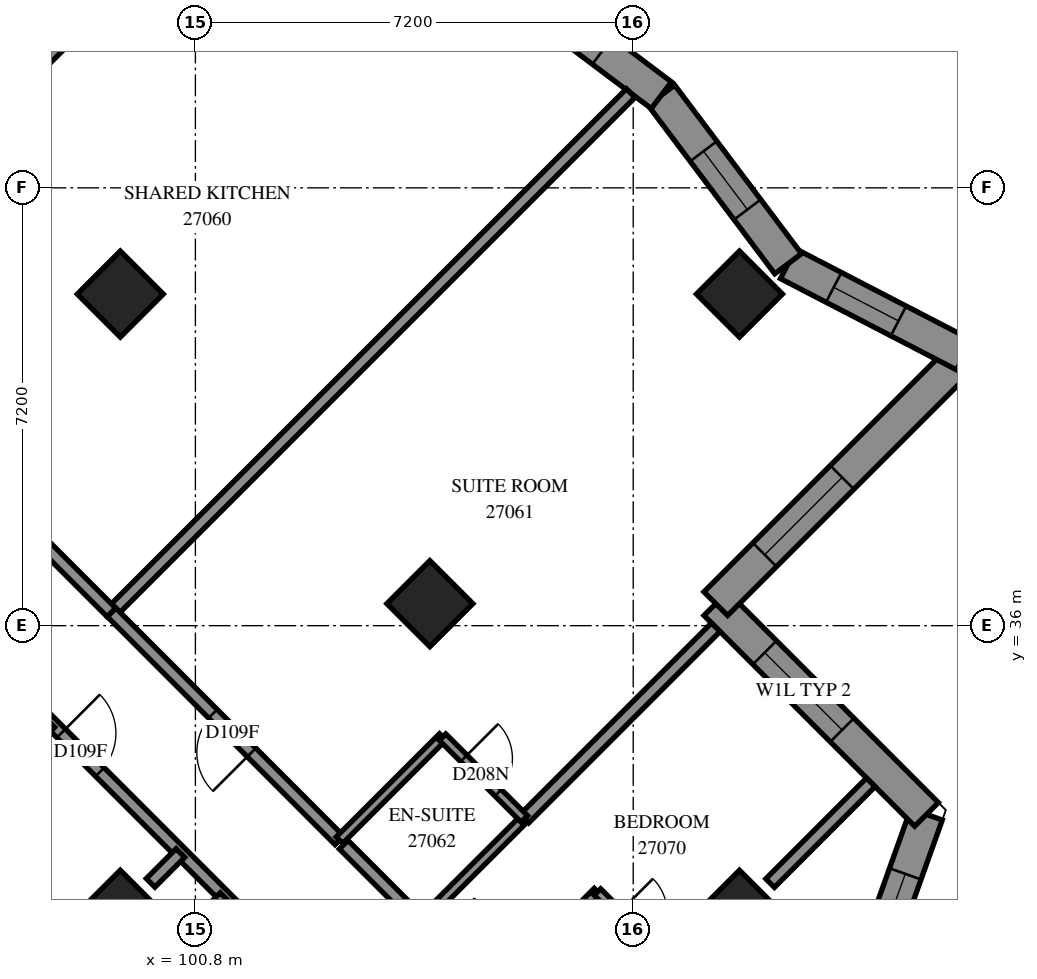
"""IFC4 building model, lengths in metres.
Left out: names, types, materials, properties, quantities, classifications, styles, units other than length and angle.
Written with IfcOpenShell. Run it as: python <this file> out.ifc"""

import sys

from ifc_helpers import new_model, si_unit, direction, frame, frame_2d, origin, origin_2d, place, context, subcontext, project, spatial, polyline, rectangle, outline, extrude, element, fill, save


model = new_model("IFC4")
c1 = context("Model", 3, precision=1e-05, world=origin(), true_north=direction((0.0, 1.0)))
c2 = subcontext(c1, "Body", "Model", "MODEL_VIEW")
j1 = project(units=[si_unit("LENGTHUNIT", "METRE"), si_unit("PLANEANGLEUNIT", "RADIAN")], contexts=[c1])
p1 = place(None, origin())
s1 = spatial("IfcSite", under=j1, at=p1, CompositionType="ELEMENT")
p2 = place(p1, origin())
s2 = spatial("IfcBuilding", under=s1, at=p2, CompositionType="ELEMENT")
p3 = place(p2, frame((0.0, 0.0, 101.6)))
s3 = spatial("IfcBuildingStorey", under=s2, at=p3, CompositionType="ELEMENT", Elevation=101.6)
for number, where, z_axis, x_axis in (
    (1, (99.565, 41.453, 0.0), (0.0, 0.0, 1.0), (0.707, -0.707, 0.0)),
    (2, (109.747, 41.453, 0.0), (0.0, 0.0, 1.0), (0.707, -0.707, 0.0)),
    (3, (104.656, 36.362, 0.0), (0.0, 0.0, 1.0), (0.707, -0.707, 0.0)),
    (4, (99.565, 31.271, 0.0), (0.0, 0.0, 1.0), (0.707, -0.707, 0.0)),
    (5, (109.747, 31.271, 0.0), (0.0, 0.0, 1.0), (0.707, -0.707, 0.0)),
):
    element("IfcColumn", number, at=place(p3, frame(where, z_axis=z_axis, x_axis=x_axis)), inside=s3, PredefinedType="COLUMN", context=c2, shape_type="SweptSolid", body=[
        extrude(rectangle(XDim=1.0, YDim=1.0, at=origin_2d()), origin(), (0.0, 0.0, 1.0), 3.1),
    ])
p4 = place(p3, frame((111.036, 27.895, 0.0), z_axis=(0.0, 0.0, 1.0), x_axis=(0.3366083403, 0.9416447447, 0.0)))
e6 = element("IfcWall", 6, at=p4, inside=s3, PredefinedType="SOLIDWALL", context=c2, shape_type="SweptSolid", body=[
    extrude(outline(polyline([(-0.125, -0.275), (5.485, -0.275), (5.137, 0.275), (0.125, 0.275), (-0.125, -0.275)])), origin(), (0.0, 0.0, 1.0), 3.1),
])
p5 = place(p4, frame((1.472, 0.0, 0.5)))
e7 = element("IfcOpeningElement", 7, at=p5, cuts=e6, PredefinedType="OPENING", context=c2, shape_type="SweptSolid", body=[
    extrude(rectangle(XDim=1.3, YDim=2.45, at=frame_2d((0.65, 1.225))), frame((0.0, 0.285, 0.0), z_axis=(0.0, -1.0, 0.0), x_axis=(1.0, 0.0, 0.0)), (0.0, 0.0, 1.0), 0.57),
])
p6 = place(p4, frame((2.972, 0.0, 0.5)))
e8 = element("IfcOpeningElement", 8, at=p6, cuts=e6, PredefinedType="OPENING", context=c2, shape_type="SweptSolid", body=[
    extrude(rectangle(XDim=1.3, YDim=2.45, at=frame_2d((0.65, 1.225))), frame((0.0, 0.285, 0.0), z_axis=(0.0, -1.0, 0.0), x_axis=(1.0, 0.0, 0.0)), (0.0, 0.0, 1.0), 0.57),
])
p7 = place(p3, frame((112.823, 32.896, 0.0), z_axis=(0.0, 0.0, 1.0), x_axis=(-0.7070965789, 0.7071169833, 0.0)))
e9 = element("IfcWall", 9, at=p7, inside=s3, PredefinedType="SOLIDWALL", context=c2, shape_type="SweptSolid", body=[
    extrude(outline(polyline([(-0.174, -0.275), (4.626, -0.275), (5.176, 0.275), (0.174, 0.275), (-0.174, -0.275)])), origin(), (0.0, 0.0, 1.0), 3.1),
])
p8 = place(p7, frame((1.963, 0.0, 0.6)))
e10 = element("IfcOpeningElement", 10, at=p8, cuts=e9, PredefinedType="OPENING", context=c2, shape_type="SweptSolid", body=[
    extrude(rectangle(XDim=1.8, YDim=1.9, at=frame_2d((0.9, 0.95))), frame((0.0, 0.285, 0.0), z_axis=(0.0, -1.0, 0.0), x_axis=(1.0, 0.0, 0.0)), (0.0, 0.0, 1.0), 0.57),
])
p9 = place(p3, frame((109.358, 36.362, 0.0), z_axis=(0.0, 0.0, 1.0), x_axis=(0.7071067812, 0.7071067812, 0.0)))
e11 = element("IfcWall", 11, at=p9, inside=s3, PredefinedType="SOLIDWALL", context=c2, shape_type="SweptSolid", body=[
    extrude(outline(polyline([(0.275, -0.275), (6.157, -0.275), (5.405, 0.275), (-0.275, 0.275), (0.275, -0.275)])), origin(), (0.0, 0.0, 1.0), 3.1),
])
p10 = place(p9, frame((1.137, 0.0, 0.6)))
e12 = element("IfcOpeningElement", 12, at=p10, cuts=e11, PredefinedType="OPENING", context=c2, shape_type="SweptSolid", body=[
    extrude(rectangle(XDim=1.8, YDim=1.9, at=frame_2d((0.9, 0.95))), frame((0.0, 0.285, 0.0), z_axis=(0.0, -1.0, 0.0), x_axis=(1.0, 0.0, 0.0)), (0.0, 0.0, 1.0), 0.57),
])
p11 = place(p3, frame((113.446, 40.45, 0.0), z_axis=(0.0, 0.0, 1.0), x_axis=(-0.8878203528, 0.4601902011, 0.0)))
e13 = element("IfcWall", 13, at=p11, inside=s3, PredefinedType="SOLIDWALL", context=c2, shape_type="SweptSolid", body=[
    extrude(outline(polyline([(-0.376, -0.275), (3.202, -0.275), (3.327, 0.275), (0.376, 0.275), (-0.376, -0.275)])), origin(), (0.0, 0.0, 1.0), 3.1),
])
p12 = place(p11, frame((1.22, 0.0, 0.5)))
e14 = element("IfcOpeningElement", 14, at=p12, cuts=e13, PredefinedType="OPENING", context=c2, shape_type="SweptSolid", body=[
    extrude(rectangle(XDim=1.2, YDim=2.45, at=frame_2d((0.6, 1.225))), frame((0.0, 0.285, 0.0), z_axis=(0.0, -1.0, 0.0), x_axis=(1.0, 0.0, 0.0)), (0.0, 0.0, 1.0), 0.57),
])
p13 = place(p3, frame((110.547, 41.952, 0.0), z_axis=(0.0, 0.0, 1.0), x_axis=(-0.6011988974, 0.7990994217, 0.0)))
e15 = element("IfcWall", 15, at=p13, inside=s3, PredefinedType="SOLIDWALL", context=c2, shape_type="SweptSolid", body=[
    extrude(outline(polyline([(0.063, -0.275), (3.507, -0.275), (3.429, 0.275), (-0.063, 0.275), (0.063, -0.275)])), origin(), (0.0, 0.0, 1.0), 3.1),
])
p14 = place(p13, frame((1.115, 0.0, 0.5)))
e16 = element("IfcOpeningElement", 16, at=p14, cuts=e15, PredefinedType="OPENING", context=c2, shape_type="SweptSolid", body=[
    extrude(rectangle(XDim=1.2, YDim=2.45, at=frame_2d((0.6, 1.225))), frame((0.0, 0.285, 0.0), z_axis=(0.0, -1.0, 0.0), x_axis=(1.0, 0.0, 0.0)), (0.0, 0.0, 1.0), 0.57),
])
p15 = place(p3, frame((108.463, 44.723, 0.0), z_axis=(0.0, 0.0, 1.0), x_axis=(-0.7991072191, 0.6011885331, 0.0)))
e17 = element("IfcWall", 17, at=p15, inside=s3, PredefinedType="SOLIDWALL", context=c2, shape_type="SweptSolid", body=[
    extrude(outline(polyline([(-0.039, -0.275), (3.405, -0.275), (3.483, 0.275), (0.039, 0.275), (-0.039, -0.275)])), origin(), (0.0, 0.0, 1.0), 3.1),
])
p16 = place(p15, frame((1.214, 0.0, 0.5)))
e18 = element("IfcOpeningElement", 18, at=p16, cuts=e17, PredefinedType="OPENING", context=c2, shape_type="SweptSolid", body=[
    extrude(rectangle(XDim=1.2, YDim=2.45, at=frame_2d((0.6, 1.225))), frame((0.0, 0.285, 0.0), z_axis=(0.0, -1.0, 0.0), x_axis=(1.0, 0.0, 0.0)), (0.0, 0.0, 1.0), 0.57),
])
p17 = place(p3, frame((92.004, 40.819, 0.0), z_axis=(0.0, 0.0, 1.0), x_axis=(0.7071067812, -0.7071067812, 0.0)))
e19 = element("IfcWall", 19, at=p17, inside=s3, PredefinedType="PARTITIONING", context=c2, shape_type="SweptSolid", body=[
    extrude(rectangle(XDim=19.298, YDim=0.2, at=frame_2d((9.649, 0.0))), origin(), (0.0, 0.0, 1.0), 3.1),
])
p18 = place(p17, frame((3.489, 0.0, 0.0)))
e20 = element("IfcOpeningElement", 20, at=p18, cuts=e19, PredefinedType="OPENING", context=c2, shape_type="SweptSolid", body=[
    extrude(rectangle(XDim=0.9, YDim=2.1, at=frame_2d((0.45, 1.05))), frame((0.0, 0.11, 0.0), z_axis=(0.0, -1.0, 0.0), x_axis=(1.0, 0.0, 0.0)), (0.0, 0.0, 1.0), 0.22),
])
p19 = place(p17, frame((9.319, 0.0, 0.0)))
e21 = element("IfcOpeningElement", 21, at=p19, cuts=e19, PredefinedType="OPENING", context=c2, shape_type="SweptSolid", body=[
    extrude(rectangle(XDim=0.9, YDim=2.1, at=frame_2d((0.45, 1.05))), frame((0.0, 0.11, 0.0), z_axis=(0.0, -1.0, 0.0), x_axis=(1.0, 0.0, 0.0)), (0.0, 0.0, 1.0), 0.22),
])
p20 = place(p17, frame((15.961, 0.0, 0.0)))
e22 = element("IfcOpeningElement", 22, at=p20, cuts=e19, PredefinedType="OPENING", context=c2, shape_type="SweptSolid", body=[
    extrude(rectangle(XDim=0.9, YDim=2.1, at=frame_2d((0.45, 1.05))), frame((0.0, 0.11, 0.0), z_axis=(0.0, -1.0, 0.0), x_axis=(1.0, 0.0, 0.0)), (0.0, 0.0, 1.0), 0.22),
])
p21 = place(p3, frame((99.423, 36.221, 0.0), z_axis=(0.0, 0.0, 1.0), x_axis=(0.7071067812, 0.7071067812, 0.0)))
e23 = element("IfcWall", 23, at=p21, inside=s3, PredefinedType="PARTITIONING", context=c2, shape_type="SweptSolid", body=[
    extrude(rectangle(XDim=12.072, YDim=0.2, at=frame_2d((6.036, 0.0))), origin(), (0.0, 0.0, 1.0), 3.1),
])
p22 = place(p3, frame((94.331, 41.313, 0.0), z_axis=(0.0, 0.0, 1.0), x_axis=(0.7071109413, 0.7071026211, 0.0)))
e24 = element("IfcWall", 24, at=p22, inside=s3, PredefinedType="PARTITIONING", context=c2, shape_type="SweptSolid", body=[
    extrude(rectangle(XDim=12.019, YDim=0.2, at=frame_2d((6.01, 0.0))), origin(), (0.0, 0.0, 1.0), 3.1),
])
p23 = place(p3, frame((93.413, 42.233, 0.0), z_axis=(0.0, 0.0, 1.0), x_axis=(0.7071067812, 0.7071067812, 0.0)))
e25 = element("IfcWall", 25, at=p23, inside=s3, PredefinedType="PARTITIONING", context=c2, shape_type="SweptSolid", body=[
    extrude(rectangle(XDim=9.699, YDim=0.2, at=frame_2d((4.849, 0.0))), origin(), (0.0, 0.0, 1.0), 3.1),
])
p24 = place(p23, frame((0.249, 0.0, 0.0)))
e26 = element("IfcOpeningElement", 26, at=p24, cuts=e25, PredefinedType="OPENING", context=c2, shape_type="SweptSolid", body=[
    extrude(rectangle(XDim=1.0, YDim=2.1, at=frame_2d((0.5, 1.05))), frame((0.0, 0.11, 0.0), z_axis=(0.0, -1.0, 0.0), x_axis=(1.0, 0.0, 0.0)), (0.0, 0.0, 1.0), 0.22),
])
p25 = place(p3, frame((93.411, 42.227, 0.0), z_axis=(0.0, 0.0, 1.0), x_axis=(0.7071067812, -0.7071067812, 0.0)))
e27 = element("IfcWall", 27, at=p25, inside=s3, PredefinedType="PARTITIONING", context=c2, shape_type="SweptSolid", body=[
    extrude(rectangle(XDim=8.499, YDim=0.2, at=frame_2d((4.25, 0.0))), origin(), (0.0, 0.0, 1.0), 3.1),
])
p26 = place(p25, frame((3.672, 0.0, 0.0)))
e28 = element("IfcOpeningElement", 28, at=p26, cuts=e27, PredefinedType="OPENING", context=c2, shape_type="SweptSolid", body=[
    extrude(rectangle(XDim=1.0, YDim=2.1, at=frame_2d((0.5, 1.05))), frame((0.0, 0.11, 0.0), z_axis=(0.0, -1.0, 0.0), x_axis=(1.0, 0.0, 0.0)), (0.0, 0.0, 1.0), 0.22),
])
p27 = place(p3, frame((103.239, 32.399, 0.0), z_axis=(0.0, 0.0, 1.0), x_axis=(0.7071067812, -0.7071067812, 0.0)))
e29 = element("IfcWall", 29, at=p27, inside=s3, PredefinedType="PARTITIONING", context=c2, shape_type="SweptSolid", body=[
    extrude(rectangle(XDim=5.399, YDim=0.2, at=frame_2d((2.7, 0.0))), origin(), (0.0, 0.0, 1.0), 3.1),
])
p28 = place(p27, frame((2.15, 0.0, 0.0)))
e30 = element("IfcOpeningElement", 30, at=p28, cuts=e29, PredefinedType="OPENING", context=c2, shape_type="SweptSolid", body=[
    extrude(rectangle(XDim=0.9, YDim=2.1, at=frame_2d((0.45, 1.05))), frame((0.0, 0.11, 0.0), z_axis=(0.0, -1.0, 0.0), x_axis=(1.0, 0.0, 0.0)), (0.0, 0.0, 1.0), 0.22),
])
p29 = place(p3, frame((103.168, 32.47, 0.0), z_axis=(0.0, 0.0, 1.0), x_axis=(-0.7067858967, 0.7074275201, 0.0)))
e31 = element("IfcWall", 31, at=p29, inside=s3, PredefinedType="PARTITIONING", context=c2, shape_type="SweptSolid", body=[
    extrude(rectangle(XDim=5.299, YDim=0.2, at=frame_2d((2.65, 0.0))), origin(), (0.0, 0.0, 1.0), 3.1),
])
p30 = place(p29, frame((2.043, 0.0, 0.0)))
e32 = element("IfcOpeningElement", 32, at=p30, cuts=e31, PredefinedType="OPENING", context=c2, shape_type="SweptSolid", body=[
    extrude(rectangle(XDim=0.9, YDim=2.1, at=frame_2d((0.45, 1.05))), frame((0.0, 0.11, 0.0), z_axis=(0.0, -1.0, 0.0), x_axis=(1.0, 0.0, 0.0)), (0.0, 0.0, 1.0), 0.22),
])
p31 = place(p3, frame((106.211, 32.827, 0.0), z_axis=(0.0, 0.0, 1.0), x_axis=(0.7071067812, 0.7071067812, 0.0)))
e33 = element("IfcWall", 33, at=p31, inside=s3, PredefinedType="PARTITIONING", context=c2, shape_type="SweptSolid", body=[
    extrude(rectangle(XDim=4.45, YDim=0.2, at=frame_2d((2.225, 0.0))), origin(), (0.0, 0.0, 1.0), 3.1),
])
for number, where, z_axis, x_axis in (
    (34, (96.735, 32.685, 0.0), (0.0, 0.0, 1.0), (0.707, 0.707, 0.0)),
    (35, (103.169, 32.473, 0.0), (0.0, 0.0, 1.0), (0.707, 0.707, 0.0)),
    (36, (99.563, 29.857, 0.0), (0.0, 0.0, 1.0), (0.707, 0.707, 0.0)),
):
    element("IfcWall", number, at=place(p3, frame(where, z_axis=z_axis, x_axis=x_axis)), inside=s3, PredefinedType="PARTITIONING", context=c2, shape_type="SweptSolid", body=[
        extrude(rectangle(XDim=2.401, YDim=0.15, at=frame_2d((1.201, 0.0))), origin(), (0.0, 0.0, 1.0), 3.1),
    ])
for number, where, z_axis, x_axis in (
    (37, (104.511, 31.133, 0.0), (0.0, 0.0, 1.0), (0.708, 0.707, 0.0)),
    (38, (105.713, 29.931, 0.0), (0.0, 0.0, 1.0), (0.708, 0.707, 0.0)),
):
    element("IfcWall", number, at=place(p3, frame(where, z_axis=z_axis, x_axis=x_axis)), inside=s3, PredefinedType="PARTITIONING", context=c2, shape_type="SweptSolid", body=[
        extrude(rectangle(XDim=2.4, YDim=0.15, at=frame_2d((1.2, 0.0))), origin(), (0.0, 0.0, 1.0), 3.1),
    ])
p32 = place(p3, frame((110.251, 31.767, 0.0), z_axis=(0.0, 0.0, 1.0), x_axis=(0.7066584143, 0.7075548639, 0.0)))
e39 = element("IfcWall", 39, at=p32, inside=s3, PredefinedType="PARTITIONING", context=c2, shape_type="SweptSolid", body=[
    extrude(rectangle(XDim=2.343, YDim=0.2, at=frame_2d((1.171, 0.0))), origin(), (0.0, 0.0, 1.0), 3.1),
])
p33 = place(p3, frame((107.411, 31.621, 0.0), z_axis=(0.0, 0.0, 1.0), x_axis=(0.7071067812, -0.7071067812, 0.0)))
e40 = element("IfcWall", 40, at=p33, inside=s3, PredefinedType="PARTITIONING", context=c2, shape_type="SweptSolid", body=[
    extrude(rectangle(XDim=1.901, YDim=0.15, at=frame_2d((0.95, 0.0))), origin(), (0.0, 0.0, 1.0), 3.1),
])
p34 = place(p33, frame((0.493, 0.0, 0.0)))
e41 = element("IfcOpeningElement", 41, at=p34, cuts=e40, PredefinedType="OPENING", context=c2, shape_type="SweptSolid", body=[
    extrude(rectangle(XDim=0.8, YDim=2.1, at=frame_2d((0.4, 1.05))), frame((0.0, 0.085, 0.0), z_axis=(0.0, -1.0, 0.0), x_axis=(1.0, 0.0, 0.0)), (0.0, 0.0, 1.0), 0.17),
])
p35 = place(p3, frame((104.865, 34.167, 0.0), z_axis=(0.0, 0.0, 1.0), x_axis=(0.7071067812, -0.7071067812, 0.0)))
e42 = element("IfcWall", 42, at=p35, inside=s3, PredefinedType="PARTITIONING", context=c2, shape_type="SweptSolid", body=[
    extrude(rectangle(XDim=1.901, YDim=0.15, at=frame_2d((0.95, 0.0))), origin(), (0.0, 0.0, 1.0), 3.1),
])
p36 = place(p35, frame((0.493, 0.0, 0.0)))
e43 = element("IfcOpeningElement", 43, at=p36, cuts=e42, PredefinedType="OPENING", context=c2, shape_type="SweptSolid", body=[
    extrude(rectangle(XDim=0.8, YDim=2.1, at=frame_2d((0.4, 1.05))), frame((0.0, 0.085, 0.0), z_axis=(0.0, -1.0, 0.0), x_axis=(1.0, 0.0, 0.0)), (0.0, 0.0, 1.0), 0.17),
])
p37 = place(p3, frame((100.063, 31.771, 0.0), z_axis=(0.0, 0.0, 1.0), x_axis=(0.7071067812, 0.7071067812, 0.0)))
e44 = element("IfcWall", 44, at=p37, inside=s3, PredefinedType="PARTITIONING", context=c2, shape_type="SweptSolid", body=[
    extrude(rectangle(XDim=0.693, YDim=0.2, at=frame_2d((0.346, 0.0))), origin(), (0.0, 0.0, 1.0), 3.1),
])
p38 = place(p6, origin())
e45 = element("IfcWindow", 45, at=p38, inside=s3, PartitioningType="SINGLE_PANEL", PredefinedType="WINDOW", context=c2, shape_type="SweptSolid", body=[
    extrude(rectangle(XDim=1.3, YDim=2.45, at=frame_2d((0.65, 1.225))), frame((0.0, 0.155, 0.0), z_axis=(0.0, -1.0, 0.0), x_axis=(1.0, 0.0, 0.0)), (0.0, 0.0, 1.0), 0.06),
])
fill(e8, e45)
p39 = place(p8, origin())
e46 = element("IfcWindow", 46, at=p39, inside=s3, PartitioningType="SINGLE_PANEL", PredefinedType="WINDOW", context=c2, shape_type="SweptSolid", body=[
    extrude(rectangle(XDim=1.8, YDim=1.9, at=frame_2d((0.9, 0.95))), frame((0.0, 0.155, 0.0), z_axis=(0.0, -1.0, 0.0), x_axis=(1.0, 0.0, 0.0)), (0.0, 0.0, 1.0), 0.06),
])
fill(e10, e46)
p40 = place(p10, origin())
e47 = element("IfcWindow", 47, at=p40, inside=s3, PartitioningType="SINGLE_PANEL", PredefinedType="WINDOW", context=c2, shape_type="SweptSolid", body=[
    extrude(rectangle(XDim=1.8, YDim=1.9, at=frame_2d((0.9, 0.95))), frame((0.0, 0.155, 0.0), z_axis=(0.0, -1.0, 0.0), x_axis=(1.0, 0.0, 0.0)), (0.0, 0.0, 1.0), 0.06),
])
fill(e12, e47)
p41 = place(p12, origin())
e48 = element("IfcWindow", 48, at=p41, inside=s3, PartitioningType="SINGLE_PANEL", PredefinedType="WINDOW", context=c2, shape_type="SweptSolid", body=[
    extrude(rectangle(XDim=1.2, YDim=2.45, at=frame_2d((0.6, 1.225))), frame((0.0, 0.155, 0.0), z_axis=(0.0, -1.0, 0.0), x_axis=(1.0, 0.0, 0.0)), (0.0, 0.0, 1.0), 0.06),
])
fill(e14, e48)
p42 = place(p14, origin())
e49 = element("IfcWindow", 49, at=p42, inside=s3, PartitioningType="SINGLE_PANEL", PredefinedType="WINDOW", context=c2, shape_type="SweptSolid", body=[
    extrude(rectangle(XDim=1.2, YDim=2.45, at=frame_2d((0.6, 1.225))), frame((0.0, 0.155, 0.0), z_axis=(0.0, -1.0, 0.0), x_axis=(1.0, 0.0, 0.0)), (0.0, 0.0, 1.0), 0.06),
])
fill(e16, e49)
p43 = place(p16, origin())
e50 = element("IfcWindow", 50, at=p43, inside=s3, PartitioningType="SINGLE_PANEL", PredefinedType="WINDOW", context=c2, shape_type="SweptSolid", body=[
    extrude(rectangle(XDim=1.2, YDim=2.45, at=frame_2d((0.6, 1.225))), frame((0.0, 0.155, 0.0), z_axis=(0.0, -1.0, 0.0), x_axis=(1.0, 0.0, 0.0)), (0.0, 0.0, 1.0), 0.06),
])
fill(e18, e50)
p44 = place(p30, origin())
e51 = element("IfcDoor", 51, at=p44, inside=s3, OperationType="SINGLE_SWING_RIGHT", PredefinedType="DOOR", context=c2, shape_type="SweptSolid", body=[
    extrude(rectangle(XDim=0.9, YDim=2.1, at=frame_2d((0.45, 1.05))), frame((0.0, 0.025, 0.0), z_axis=(0.0, -1.0, 0.0), x_axis=(1.0, 0.0, 0.0)), (0.0, 0.0, 1.0), 0.05),
])
fill(e32, e51)
p45 = place(p36, origin())
e52 = element("IfcDoor", 52, at=p45, inside=s3, OperationType="SINGLE_SWING_RIGHT", PredefinedType="DOOR", context=c2, shape_type="SweptSolid", body=[
    extrude(rectangle(XDim=0.8, YDim=2.1, at=frame_2d((0.4, 1.05))), frame((0.0, 0.025, 0.0), z_axis=(0.0, -1.0, 0.0), x_axis=(1.0, 0.0, 0.0)), (0.0, 0.0, 1.0), 0.05),
])
fill(e43, e52)
p46 = place(p19, origin())
e53 = element("IfcDoor", 53, at=p46, inside=s3, OperationType="SINGLE_SWING_RIGHT", PredefinedType="DOOR", context=c2, shape_type="SweptSolid", body=[
    extrude(rectangle(XDim=0.9, YDim=2.1, at=frame_2d((0.45, 1.05))), frame((0.0, 0.025, 0.0), z_axis=(0.0, -1.0, 0.0), x_axis=(1.0, 0.0, 0.0)), (0.0, 0.0, 1.0), 0.05),
])
fill(e21, e53)
save(model, sys.argv[1])
